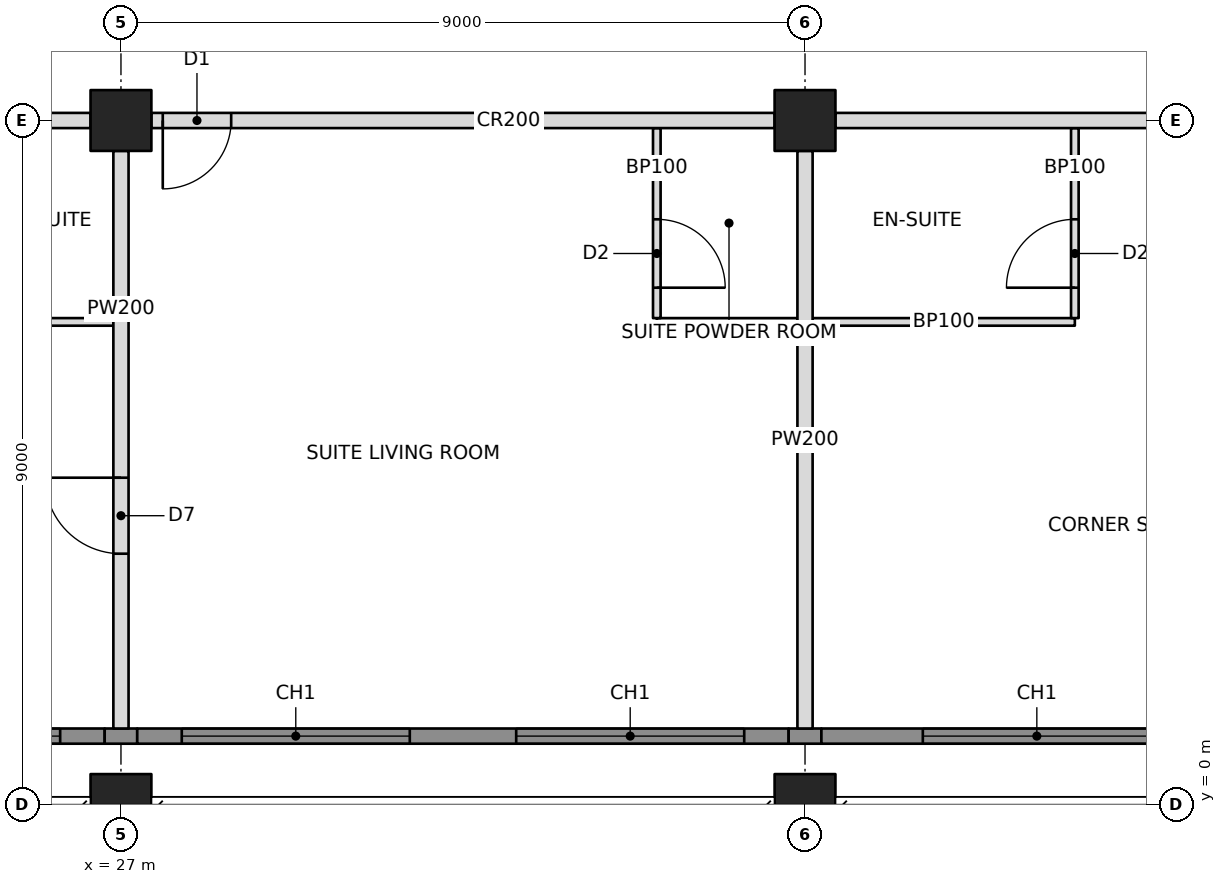
"""IFC4 building model, lengths in metres.
Left out: names, types, materials, properties, quantities, classifications, styles, units other than length and angle.
Written with IfcOpenShell. Run it as: python <this file> out.ifc"""

import sys

from ifc_helpers import new_model, si_unit, direction, frame, frame_2d, origin, origin_2d, place, context, subcontext, project, spatial, rectangle, hollow_rectangle, extrude, element, fill, save


model = new_model("IFC4")
c1 = context("Model", 3, precision=1e-05, world=origin(), true_north=direction((0.0, 1.0)))
c2 = subcontext(c1, "Body", "Model", "MODEL_VIEW")
j1 = project(units=[si_unit("LENGTHUNIT", "METRE"), si_unit("PLANEANGLEUNIT", "RADIAN")], contexts=[c1])
p1 = place(None, origin())
s1 = spatial("IfcSite", under=j1, at=p1, CompositionType="ELEMENT")
p2 = place(p1, origin())
s2 = spatial("IfcBuilding", under=s1, at=p2, CompositionType="ELEMENT")
p3 = place(p2, frame((0.0, 0.0, 218.2)))
s3 = spatial("IfcBuildingStorey", under=s2, at=p3, CompositionType="ELEMENT", Elevation=218.2)
p4 = place(p3, frame((27.0, 0.0, 0.0), z_axis=(0.0, 0.0, 1.0), x_axis=(1.0, 0.0, 0.0)))
e1 = element("IfcColumn", 1, at=p4, inside=s3, PredefinedType="COLUMN", context=c2, shape_type="SweptSolid", body=[
    extrude(hollow_rectangle(XDim=0.8, YDim=0.8, WallThickness=0.06, at=origin_2d()), origin(), (0.0, 0.0, 1.0), 3.4),
])
p5 = place(p3, frame((27.0, 9.0, 0.0), z_axis=(0.0, 0.0, 1.0), x_axis=(1.0, 0.0, 0.0)))
e2 = element("IfcColumn", 2, at=p5, inside=s3, PredefinedType="COLUMN", context=c2, shape_type="SweptSolid", body=[
    extrude(hollow_rectangle(XDim=0.8, YDim=0.8, WallThickness=0.1, at=origin_2d()), origin(), (0.0, 0.0, 1.0), 3.4),
])
p6 = place(p3, frame((36.0, 0.0, 0.0), z_axis=(0.0, 0.0, 1.0), x_axis=(1.0, 0.0, 0.0)))
e3 = element("IfcColumn", 3, at=p6, inside=s3, PredefinedType="COLUMN", context=c2, shape_type="SweptSolid", body=[
    extrude(hollow_rectangle(XDim=0.8, YDim=0.8, WallThickness=0.06, at=origin_2d()), origin(), (0.0, 0.0, 1.0), 3.4),
])
p7 = place(p3, frame((36.0, 9.0, 0.0), z_axis=(0.0, 0.0, 1.0), x_axis=(0.0, 1.0, 0.0)))
e4 = element("IfcColumn", 4, at=p7, inside=s3, PredefinedType="COLUMN", context=c2, shape_type="SweptSolid", body=[
    extrude(hollow_rectangle(XDim=0.8, YDim=0.8, WallThickness=0.1, at=origin_2d()), origin(), (0.0, 0.0, 1.0), 3.4),
])
p8 = place(p3, frame((18.4, 9.0, 0.0), z_axis=(0.0, 0.0, 1.0), x_axis=(1.0, 0.0, 0.0)))
e5 = element("IfcWall", 5, at=p8, inside=s3, PredefinedType="PARTITIONING", context=c2, shape_type="SweptSolid", body=[
    extrude(rectangle(XDim=8.2, YDim=0.2, at=frame_2d((4.1, 0.0))), origin(), (0.0, 0.0, 1.0), 2.21),
])
p9 = place(p8, frame((2.95, 0.0, 0.0)))
e6 = element("IfcOpeningElement", 6, at=p9, cuts=e5, PredefinedType="OPENING", context=c2, shape_type="SweptSolid", body=[
    extrude(rectangle(XDim=0.9, YDim=2.1, at=frame_2d((0.45, 1.05))), frame((0.0, 0.11, 0.0), z_axis=(0.0, -1.0, 0.0), x_axis=(1.0, 0.0, 0.0)), (0.0, 0.0, 1.0), 0.22),
])
p10 = place(p8, frame((4.35, 0.0, 0.0)))
e7 = element("IfcOpeningElement", 7, at=p10, cuts=e5, PredefinedType="OPENING", context=c2, shape_type="SweptSolid", body=[
    extrude(rectangle(XDim=0.9, YDim=2.1, at=frame_2d((0.45, 1.05))), frame((0.0, 0.11, 0.0), z_axis=(0.0, -1.0, 0.0), x_axis=(1.0, 0.0, 0.0)), (0.0, 0.0, 1.0), 0.22),
])
p11 = place(p3, frame((27.4, 9.0, 0.0), z_axis=(0.0, 0.0, 1.0), x_axis=(1.0, 0.0, 0.0)))
e8 = element("IfcWall", 8, at=p11, inside=s3, PredefinedType="PARTITIONING", context=c2, shape_type="SweptSolid", body=[
    extrude(rectangle(XDim=8.2, YDim=0.2, at=frame_2d((4.1, 0.0))), origin(), (0.0, 0.0, 1.0), 2.21),
])
p12 = place(p11, frame((0.15, 0.0, 0.0)))
e9 = element("IfcOpeningElement", 9, at=p12, cuts=e8, PredefinedType="OPENING", context=c2, shape_type="SweptSolid", body=[
    extrude(rectangle(XDim=0.9, YDim=2.1, at=frame_2d((0.45, 1.05))), frame((0.0, 0.11, 0.0), z_axis=(0.0, -1.0, 0.0), x_axis=(1.0, 0.0, 0.0)), (0.0, 0.0, 1.0), 0.22),
])
p13 = place(p3, frame((36.4, 9.0, 0.0), z_axis=(0.0, 0.0, 1.0), x_axis=(1.0, 0.0, 0.0)))
e10 = element("IfcWall", 10, at=p13, inside=s3, PredefinedType="PARTITIONING", context=c2, shape_type="SweptSolid", body=[
    extrude(rectangle(XDim=7.6, YDim=0.2, at=frame_2d((3.8, 0.0))), origin(), (0.0, 0.0, 1.0), 2.21),
])
p14 = place(p13, frame((6.45, 0.0, 0.0)))
e11 = element("IfcOpeningElement", 11, at=p14, cuts=e10, PredefinedType="OPENING", context=c2, shape_type="SweptSolid", body=[
    extrude(rectangle(XDim=0.9, YDim=2.1, at=frame_2d((0.45, 1.05))), frame((0.0, 0.11, 0.0), z_axis=(0.0, -1.0, 0.0), x_axis=(1.0, 0.0, 0.0)), (0.0, 0.0, 1.0), 0.22),
])
p15 = place(p3, frame((27.0, 8.6, 0.0), z_axis=(0.0, 0.0, 1.0), x_axis=(0.0, -1.0, 0.0)))
e12 = element("IfcWall", 12, at=p15, inside=s3, PredefinedType="PARTITIONING", context=c2, shape_type="SweptSolid", body=[
    extrude(rectangle(XDim=7.6, YDim=0.2, at=frame_2d((3.8, 0.0))), origin(), (0.0, 0.0, 1.0), 2.203),
])
p16 = place(p15, frame((4.3, 0.0, 0.0)))
e13 = element("IfcOpeningElement", 13, at=p16, cuts=e12, PredefinedType="OPENING", context=c2, shape_type="SweptSolid", body=[
    extrude(rectangle(XDim=1.0, YDim=2.1, at=frame_2d((0.5, 1.05))), frame((0.0, 0.11, 0.0), z_axis=(0.0, -1.0, 0.0), x_axis=(1.0, 0.0, 0.0)), (0.0, 0.0, 1.0), 0.22),
])
p17 = place(p3, frame((36.0, 8.6, 0.0), z_axis=(0.0, 0.0, 1.0), x_axis=(0.0, -1.0, 0.0)))
e14 = element("IfcWall", 14, at=p17, inside=s3, PredefinedType="PARTITIONING", context=c2, shape_type="SweptSolid", body=[
    extrude(rectangle(XDim=7.6, YDim=0.2, at=frame_2d((3.8, 0.0))), origin(), (0.0, 0.0, 1.0), 2.21),
])
p18 = place(p3, frame((23.95, 6.35, 0.0), z_axis=(0.0, 0.0, 1.0), x_axis=(1.0, 0.0, 0.0)))
e15 = element("IfcWall", 15, at=p18, inside=s3, PredefinedType="PARTITIONING", context=c2, shape_type="SweptSolid", body=[
    extrude(rectangle(XDim=2.95, YDim=0.1, at=frame_2d((1.475, 0.0))), origin(), (0.0, 0.0, 1.0), 2.202),
])
p19 = place(p3, frame((34.05, 6.35, 0.0), z_axis=(0.0, 0.0, 1.0), x_axis=(1.0, 0.0, 0.0)))
e16 = element("IfcWall", 16, at=p19, inside=s3, PredefinedType="PARTITIONING", context=c2, shape_type="SweptSolid", body=[
    extrude(rectangle(XDim=1.85, YDim=0.1, at=frame_2d((0.925, 0.0))), origin(), (0.0, 0.0, 1.0), 2.21),
])
p20 = place(p3, frame((34.05, 8.9, 0.0), z_axis=(0.0, 0.0, 1.0), x_axis=(0.0, -1.0, 0.0)))
e17 = element("IfcWall", 17, at=p20, inside=s3, PredefinedType="PARTITIONING", context=c2, shape_type="SweptSolid", body=[
    extrude(rectangle(XDim=2.5, YDim=0.1, at=frame_2d((1.25, 0.0))), origin(), (0.0, 0.0, 1.0), 2.21),
])
p21 = place(p20, frame((1.2, 0.0, 0.0)))
e18 = element("IfcOpeningElement", 18, at=p21, cuts=e17, PredefinedType="OPENING", context=c2, shape_type="SweptSolid", body=[
    extrude(rectangle(XDim=0.9, YDim=2.1, at=frame_2d((0.45, 1.05))), frame((0.0, 0.06, 0.0), z_axis=(0.0, -1.0, 0.0), x_axis=(1.0, 0.0, 0.0)), (0.0, 0.0, 1.0), 0.12),
])
p22 = place(p3, frame((36.1, 6.35, 0.0), z_axis=(0.0, 0.0, 1.0), x_axis=(1.0, 0.0, 0.0)))
e19 = element("IfcWall", 19, at=p22, inside=s3, PredefinedType="PARTITIONING", context=c2, shape_type="SweptSolid", body=[
    extrude(rectangle(XDim=3.45, YDim=0.1, at=frame_2d((1.725, 0.0))), origin(), (0.0, 0.0, 1.0), 2.21),
])
p23 = place(p3, frame((39.55, 8.9, 0.0), z_axis=(0.0, 0.0, 1.0), x_axis=(0.0, -1.0, 0.0)))
e20 = element("IfcWall", 20, at=p23, inside=s3, PredefinedType="PARTITIONING", context=c2, shape_type="SweptSolid", body=[
    extrude(rectangle(XDim=2.5, YDim=0.1, at=frame_2d((1.25, 0.0))), origin(), (0.0, 0.0, 1.0), 2.21),
])
p24 = place(p23, frame((1.2, 0.0, 0.0)))
e21 = element("IfcOpeningElement", 21, at=p24, cuts=e20, PredefinedType="OPENING", context=c2, shape_type="SweptSolid", body=[
    extrude(rectangle(XDim=0.9, YDim=2.1, at=frame_2d((0.45, 1.05))), frame((0.0, 0.06, 0.0), z_axis=(0.0, -1.0, 0.0), x_axis=(1.0, 0.0, 0.0)), (0.0, 0.0, 1.0), 0.12),
])
p25 = place(p3, frame((18.214, 0.9, 0.0), z_axis=(0.0, 0.0, 1.0), x_axis=(1.0, 0.0, 0.0)))
e22 = element("IfcWall", 22, at=p25, inside=s3, PredefinedType="SOLIDWALL", context=c2, shape_type="SweptSolid", body=[
    extrude(rectangle(XDim=8.572, YDim=0.2, at=frame_2d((4.286, 0.0))), origin(), (0.0, 0.0, 1.0), 3.15),
])
p26 = place(p25, frame((0.586, 0.0, 0.6)))
e23 = element("IfcOpeningElement", 23, at=p26, cuts=e22, PredefinedType="OPENING", context=c2, shape_type="SweptSolid", body=[
    extrude(rectangle(XDim=3.0, YDim=2.2, at=frame_2d((1.5, 1.1))), frame((0.0, 0.11, 0.0), z_axis=(0.0, -1.0, 0.0), x_axis=(1.0, 0.0, 0.0)), (0.0, 0.0, 1.0), 0.22),
])
p27 = place(p25, frame((4.986, 0.0, 0.6)))
e24 = element("IfcOpeningElement", 24, at=p27, cuts=e22, PredefinedType="OPENING", context=c2, shape_type="SweptSolid", body=[
    extrude(rectangle(XDim=3.0, YDim=2.2, at=frame_2d((1.5, 1.1))), frame((0.0, 0.11, 0.0), z_axis=(0.0, -1.0, 0.0), x_axis=(1.0, 0.0, 0.0)), (0.0, 0.0, 1.0), 0.22),
])
p28 = place(p3, frame((26.786, 0.9, 0.0), z_axis=(0.0, 0.0, 1.0), x_axis=(1.0, 0.0, 0.0)))
e25 = element("IfcWall", 25, at=p28, inside=s3, PredefinedType="SOLIDWALL", context=c2, shape_type="SweptSolid", body=[
    extrude(rectangle(XDim=0.428, YDim=0.2, at=frame_2d((0.214, 0.0))), origin(), (0.0, 0.0, 1.0), 2.202),
])
p29 = place(p3, frame((27.214, 0.9, 0.0), z_axis=(0.0, 0.0, 1.0), x_axis=(1.0, 0.0, 0.0)))
e26 = element("IfcWall", 26, at=p29, inside=s3, PredefinedType="SOLIDWALL", context=c2, shape_type="SweptSolid", body=[
    extrude(rectangle(XDim=8.571, YDim=0.2, at=frame_2d((4.285, 0.0))), origin(), (0.0, 0.0, 1.0), 3.15),
])
p30 = place(p29, frame((0.586, 0.0, 0.6)))
e27 = element("IfcOpeningElement", 27, at=p30, cuts=e26, PredefinedType="OPENING", context=c2, shape_type="SweptSolid", body=[
    extrude(rectangle(XDim=3.0, YDim=2.2, at=frame_2d((1.5, 1.1))), frame((0.0, 0.11, 0.0), z_axis=(0.0, -1.0, 0.0), x_axis=(1.0, 0.0, 0.0)), (0.0, 0.0, 1.0), 0.22),
])
p31 = place(p29, frame((4.986, 0.0, 0.6)))
e28 = element("IfcOpeningElement", 28, at=p31, cuts=e26, PredefinedType="OPENING", context=c2, shape_type="SweptSolid", body=[
    extrude(rectangle(XDim=3.0, YDim=2.2, at=frame_2d((1.5, 1.1))), frame((0.0, 0.11, 0.0), z_axis=(0.0, -1.0, 0.0), x_axis=(1.0, 0.0, 0.0)), (0.0, 0.0, 1.0), 0.22),
])
p32 = place(p3, frame((35.785, 0.9, 0.0), z_axis=(0.0, 0.0, 1.0), x_axis=(1.0, 0.0, 0.0)))
e29 = element("IfcWall", 29, at=p32, inside=s3, PredefinedType="SOLIDWALL", context=c2, shape_type="SweptSolid", body=[
    extrude(rectangle(XDim=0.431, YDim=0.2, at=frame_2d((0.215, 0.0))), origin(), (0.0, 0.0, 1.0), 2.21),
])
p33 = place(p3, frame((36.215, 0.9, 0.0), z_axis=(0.0, 0.0, 1.0), x_axis=(1.0, 0.0, 0.0)))
e30 = element("IfcWall", 30, at=p33, inside=s3, PredefinedType="SOLIDWALL", context=c2, shape_type="SweptSolid", body=[
    extrude(rectangle(XDim=5.785, YDim=0.2, at=frame_2d((2.892, 0.0))), origin(), (0.0, 0.0, 1.0), 3.15),
])
p34 = place(p33, frame((1.335, 0.0, 0.6)))
e31 = element("IfcOpeningElement", 31, at=p34, cuts=e30, PredefinedType="OPENING", context=c2, shape_type="SweptSolid", body=[
    extrude(rectangle(XDim=3.0, YDim=2.2, at=frame_2d((1.5, 1.1))), frame((0.0, 0.11, 0.0), z_axis=(0.0, -1.0, 0.0), x_axis=(1.0, 0.0, 0.0)), (0.0, 0.0, 1.0), 0.22),
])
p35 = place(p27, origin())
e32 = element("IfcWindow", 32, at=p35, inside=s3, PartitioningType="TRIPLE_PANEL_VERTICAL", PredefinedType="WINDOW", context=c2, shape_type="SweptSolid", body=[
    extrude(rectangle(XDim=3.0, YDim=2.2, at=frame_2d((1.5, 1.1))), frame((0.0, 0.03, 0.0), z_axis=(0.0, -1.0, 0.0), x_axis=(1.0, 0.0, 0.0)), (0.0, 0.0, 1.0), 0.06),
])
fill(e24, e32)
p36 = place(p30, origin())
e33 = element("IfcWindow", 33, at=p36, inside=s3, PartitioningType="TRIPLE_PANEL_VERTICAL", PredefinedType="WINDOW", context=c2, shape_type="SweptSolid", body=[
    extrude(rectangle(XDim=3.0, YDim=2.2, at=frame_2d((1.5, 1.1))), frame((0.0, 0.03, 0.0), z_axis=(0.0, -1.0, 0.0), x_axis=(1.0, 0.0, 0.0)), (0.0, 0.0, 1.0), 0.06),
])
fill(e27, e33)
p37 = place(p31, origin())
e34 = element("IfcWindow", 34, at=p37, inside=s3, PartitioningType="TRIPLE_PANEL_VERTICAL", PredefinedType="WINDOW", context=c2, shape_type="SweptSolid", body=[
    extrude(rectangle(XDim=3.0, YDim=2.2, at=frame_2d((1.5, 1.1))), frame((0.0, 0.03, 0.0), z_axis=(0.0, -1.0, 0.0), x_axis=(1.0, 0.0, 0.0)), (0.0, 0.0, 1.0), 0.06),
])
fill(e28, e34)
p38 = place(p34, origin())
e35 = element("IfcWindow", 35, at=p38, inside=s3, PartitioningType="TRIPLE_PANEL_VERTICAL", PredefinedType="WINDOW", context=c2, shape_type="SweptSolid", body=[
    extrude(rectangle(XDim=3.0, YDim=2.2, at=frame_2d((1.5, 1.1))), frame((0.0, 0.03, 0.0), z_axis=(0.0, -1.0, 0.0), x_axis=(1.0, 0.0, 0.0)), (0.0, 0.0, 1.0), 0.06),
])
fill(e31, e35)
p39 = place(p16, frame((1.0, 0.0, 0.0), z_axis=(0.0, 0.0, 1.0), x_axis=(-1.0, 0.0, 0.0)))
e36 = element("IfcDoor", 36, at=p39, inside=s3, OperationType="SINGLE_SWING_RIGHT", PredefinedType="DOOR", context=c2, shape_type="SweptSolid", body=[
    extrude(rectangle(XDim=1.0, YDim=2.1, at=frame_2d((0.5, 1.05))), frame((0.0, 0.025, 0.0), z_axis=(0.0, -1.0, 0.0), x_axis=(1.0, 0.0, 0.0)), (0.0, 0.0, 1.0), 0.05),
])
fill(e13, e36)
p40 = place(p21, origin())
e37 = element("IfcDoor", 37, at=p40, inside=s3, OperationType="SINGLE_SWING_RIGHT", PredefinedType="DOOR", context=c2, shape_type="SweptSolid", body=[
    extrude(rectangle(XDim=0.9, YDim=2.1, at=frame_2d((0.45, 1.05))), frame((0.0, 0.025, 0.0), z_axis=(0.0, -1.0, 0.0), x_axis=(1.0, 0.0, 0.0)), (0.0, 0.0, 1.0), 0.05),
])
fill(e18, e37)
p41 = place(p12, frame((0.9, 0.0, 0.0), z_axis=(0.0, 0.0, 1.0), x_axis=(-1.0, 0.0, 0.0)))
e38 = element("IfcDoor", 38, at=p41, inside=s3, OperationType="SINGLE_SWING_RIGHT", PredefinedType="DOOR", context=c2, shape_type="SweptSolid", body=[
    extrude(rectangle(XDim=0.9, YDim=2.1, at=frame_2d((0.45, 1.05))), frame((0.0, 0.025, 0.0), z_axis=(0.0, -1.0, 0.0), x_axis=(1.0, 0.0, 0.0)), (0.0, 0.0, 1.0), 0.05),
])
fill(e9, e38)
p42 = place(p24, frame((0.9, 0.0, 0.0), z_axis=(0.0, 0.0, 1.0), x_axis=(-1.0, 0.0, 0.0)))
e39 = element("IfcDoor", 39, at=p42, inside=s3, OperationType="SINGLE_SWING_LEFT", PredefinedType="DOOR", context=c2, shape_type="SweptSolid", body=[
    extrude(rectangle(XDim=0.9, YDim=2.1, at=frame_2d((0.45, 1.05))), frame((0.0, 0.025, 0.0), z_axis=(0.0, -1.0, 0.0), x_axis=(1.0, 0.0, 0.0)), (0.0, 0.0, 1.0), 0.05),
])
fill(e21, e39)
save(model, sys.argv[1])
